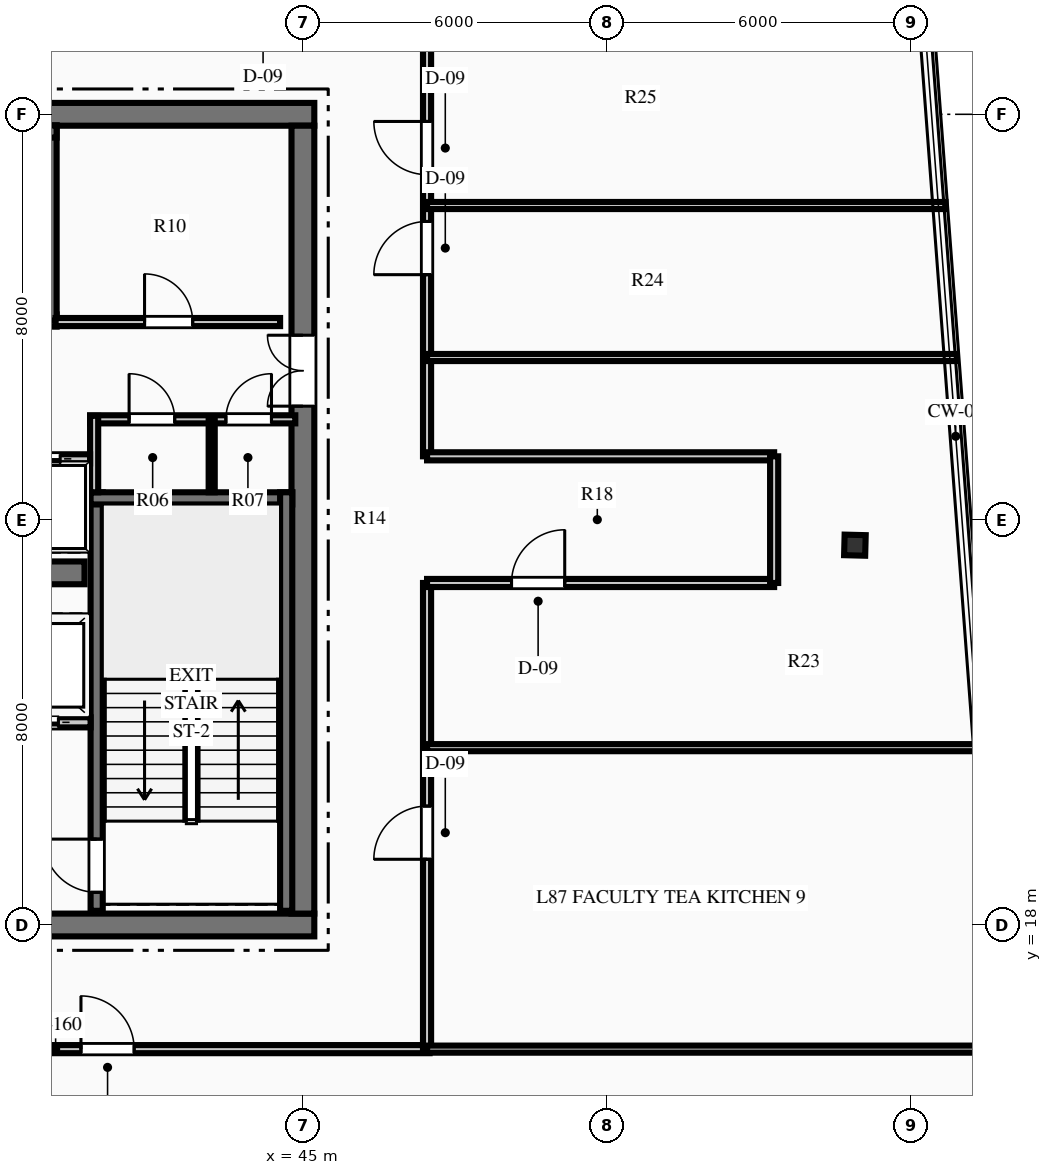
"""IFC4 building model, lengths in metres.
Left out: names, types, materials, properties, quantities, classifications, styles, units other than length and angle.
Written with IfcOpenShell. Run it as: python <this file> out.ifc"""

import sys

from ifc_helpers import new_model, si_unit, direction, frame, frame_2d, origin, origin_2d, place, context, subcontext, project, spatial, rectangle, i_section, extrude, element, fill, save


model = new_model("IFC4")
c1 = context("Model", 3, precision=1e-05, world=origin(), true_north=direction((0.0, 1.0)))
c2 = subcontext(c1, "Body", "Model", "MODEL_VIEW")
j1 = project(units=[si_unit("LENGTHUNIT", "METRE"), si_unit("PLANEANGLEUNIT", "RADIAN")], contexts=[c1])
p1 = place(None, origin())
s1 = spatial("IfcSite", under=j1, at=p1, CompositionType="ELEMENT")
p2 = place(p1, origin())
s2 = spatial("IfcBuilding", under=s1, at=p2, CompositionType="ELEMENT")
p3 = place(p2, frame((0.0, 0.0, 343.95)))
s3 = spatial("IfcBuildingStorey", under=s2, at=p3, CompositionType="ELEMENT", Elevation=343.95)
p4 = place(p3, frame((26.775, 18.0, 0.0), z_axis=(0.0, 0.0, 1.0), x_axis=(1.0, 0.0, 0.0)))
e1 = element("IfcWall", 1, at=p4, inside=s3, PredefinedType="SHEAR", context=c2, shape_type="SweptSolid", body=[
    extrude(rectangle(XDim=18.45, YDim=0.45, at=frame_2d((9.225, 0.0))), origin(), (0.0, 0.0, 1.0), 3.75),
])
p5 = place(p4, frame((7.325, 0.0, 0.0)))
e2 = element("IfcOpeningElement", 2, at=p5, cuts=e1, PredefinedType="OPENING", context=c2, shape_type="SweptSolid", body=[
    extrude(rectangle(XDim=1.1, YDim=2.15, at=frame_2d((0.55, 1.075))), frame((0.0, 0.235, 0.0), z_axis=(0.0, -1.0, 0.0), x_axis=(1.0, 0.0, 0.0)), (0.0, 0.0, 1.0), 0.47),
])
p6 = place(p4, frame((10.025, 0.0, 0.0)))
e3 = element("IfcOpeningElement", 3, at=p6, cuts=e1, PredefinedType="OPENING", context=c2, shape_type="SweptSolid", body=[
    extrude(rectangle(XDim=1.1, YDim=2.15, at=frame_2d((0.55, 1.075))), frame((0.0, 0.235, 0.0), z_axis=(0.0, -1.0, 0.0), x_axis=(1.0, 0.0, 0.0)), (0.0, 0.0, 1.0), 0.47),
])
p7 = place(p3, frame((26.775, 34.0, 0.0), z_axis=(0.0, 0.0, 1.0), x_axis=(1.0, 0.0, 0.0)))
e4 = element("IfcWall", 4, at=p7, inside=s3, PredefinedType="SHEAR", context=c2, shape_type="SweptSolid", body=[
    extrude(rectangle(XDim=18.45, YDim=0.45, at=frame_2d((9.225, 0.0))), origin(), (0.0, 0.0, 1.0), 3.75),
])
p8 = place(p3, frame((45.0, 18.225, 0.0), z_axis=(0.0, 0.0, 1.0), x_axis=(0.0, 1.0, 0.0)))
e5 = element("IfcWall", 5, at=p8, inside=s3, PredefinedType="SHEAR", context=c2, shape_type="SweptSolid", body=[
    extrude(rectangle(XDim=15.55, YDim=0.45, at=frame_2d((7.775, 0.0))), origin(), (0.0, 0.0, 1.0), 3.75),
])
p9 = place(p8, frame((10.015, 0.0, 0.0)))
e6 = element("IfcOpeningElement", 6, at=p9, cuts=e5, PredefinedType="OPENING", context=c2, shape_type="SweptSolid", body=[
    extrude(rectangle(XDim=1.4, YDim=2.2, at=frame_2d((0.7, 1.1))), frame((0.0, 0.235, 0.0), z_axis=(0.0, -1.0, 0.0), x_axis=(1.0, 0.0, 0.0)), (0.0, 0.0, 1.0), 0.47),
])
p10 = place(p3, frame((31.31, 24.95, 0.0), z_axis=(0.0, 0.0, 1.0), x_axis=(1.0, 0.0, 0.0)))
e7 = element("IfcWall", 7, at=p10, inside=s3, PredefinedType="SHEAR", context=c2, shape_type="SweptSolid", body=[
    extrude(rectangle(XDim=9.38, YDim=0.45, at=frame_2d((4.69, 0.0))), origin(), (0.0, 0.0, 1.0), 3.75),
])
p11 = place(p3, frame((40.93, 18.28, 0.0), z_axis=(0.0, 0.0, 1.0), x_axis=(0.0, 1.0, 0.0)))
e8 = element("IfcWall", 8, at=p11, inside=s3, PredefinedType="SHEAR", context=c2, shape_type="SweptSolid", body=[
    extrude(rectangle(XDim=8.26, YDim=0.24, at=frame_2d((4.13, 0.0))), origin(), (0.0, 0.0, 1.0), 3.75),
])
p12 = place(p11, frame((0.365, 0.0, 0.0)))
e9 = element("IfcOpeningElement", 9, at=p12, cuts=e8, PredefinedType="OPENING", context=c2, shape_type="SweptSolid", body=[
    extrude(rectangle(XDim=1.05, YDim=2.15, at=frame_2d((0.525, 1.075))), frame((0.0, 0.13, 0.0), z_axis=(0.0, -1.0, 0.0), x_axis=(1.0, 0.0, 0.0)), (0.0, 0.0, 1.0), 0.26),
])
p13 = place(p3, frame((40.81, 26.42, 0.0), z_axis=(0.0, 0.0, 1.0), x_axis=(1.0, 0.0, 0.0)))
e10 = element("IfcWall", 10, at=p13, inside=s3, PredefinedType="SHEAR", context=c2, shape_type="SweptSolid", body=[
    extrude(rectangle(XDim=3.98, YDim=0.24, at=frame_2d((1.99, 0.0))), origin(), (0.0, 0.0, 1.0), 3.75),
])
p14 = place(p3, frame((44.67, 18.28, 0.0), z_axis=(0.0, 0.0, 1.0), x_axis=(0.0, 1.0, 0.0)))
e11 = element("IfcWall", 11, at=p14, inside=s3, PredefinedType="SHEAR", context=c2, shape_type="SweptSolid", body=[
    extrude(rectangle(XDim=8.26, YDim=0.24, at=frame_2d((4.13, 0.0))), origin(), (0.0, 0.0, 1.0), 3.75),
])
p15 = place(p3, frame((31.76, 29.93, 0.0), z_axis=(0.0, 0.0, 1.0), x_axis=(1.0, 0.0, 0.0)))
e12 = element("IfcWall", 12, at=p15, inside=s3, PredefinedType="SHEAR", context=c2, shape_type="SweptSolid", body=[
    extrude(rectangle(XDim=8.38, YDim=0.24, at=frame_2d((4.19, 0.0))), origin(), (0.0, 0.0, 1.0), 3.75),
])
p16 = place(p15, frame((0.565, 0.0, 0.0)))
e13 = element("IfcOpeningElement", 13, at=p16, cuts=e12, PredefinedType="OPENING", context=c2, shape_type="SweptSolid", body=[
    extrude(rectangle(XDim=1.05, YDim=2.15, at=frame_2d((0.525, 1.075))), frame((0.0, 0.13, 0.0), z_axis=(0.0, -1.0, 0.0), x_axis=(1.0, 0.0, 0.0)), (0.0, 0.0, 1.0), 0.26),
])
p17 = place(p3, frame((40.02, 29.93, 0.0), z_axis=(0.0, 0.0, 1.0), x_axis=(0.0, 1.0, 0.0)))
e14 = element("IfcWall", 14, at=p17, inside=s3, PredefinedType="SHEAR", context=c2, shape_type="SweptSolid", body=[
    extrude(rectangle(XDim=3.85, YDim=0.24, at=frame_2d((1.925, 0.0))), origin(), (0.0, 0.0, 1.0), 3.75),
])
p18 = place(p3, frame((37.85, 33.66, 0.0), z_axis=(0.0, 0.0, 1.0), x_axis=(1.0, 0.0, 0.0)))
e15 = element("IfcWall", 15, at=p18, inside=s3, PredefinedType="SHEAR", context=c2, shape_type="SweptSolid", body=[
    extrude(rectangle(XDim=2.29, YDim=0.24, at=frame_2d((1.145, 0.0))), origin(), (0.0, 0.0, 1.0), 3.75),
])
p19 = place(p3, frame((55.894, 25.496, 0.0), z_axis=(0.0, 0.0, 1.0), x_axis=(0.025304572866, 0.999679788028, 0.0)))
e16 = element("IfcColumn", 16, at=p19, inside=s3, PredefinedType="COLUMN", context=c2, shape_type="SweptSolid", body=[
    extrude(i_section(OverallWidth=0.406, OverallDepth=0.416, WebThickness=0.03, FlangeThickness=0.048, at=origin_2d()), origin(), (0.0, 0.0, 1.0), 3.75),
])
p20 = place(p3, frame((36.12, 22.0, 0.0), z_axis=(0.0, 0.0, 1.0), x_axis=(1.0, 0.0, 0.0)))
e17 = element("IfcWall", 17, at=p20, inside=s3, PredefinedType="PARTITIONING", context=c2, shape_type="SweptSolid", body=[
    extrude(rectangle(XDim=4.69, YDim=0.2, at=frame_2d((2.345, 0.0))), origin(), (0.0, 0.0, 1.0), 3.43),
])
p21 = place(p20, frame((2.955, 0.0, 0.0)))
e18 = element("IfcOpeningElement", 18, at=p21, cuts=e17, PredefinedType="OPENING", context=c2, shape_type="SweptSolid", body=[
    extrude(rectangle(XDim=1.1, YDim=2.15, at=frame_2d((0.55, 1.075))), frame((0.0, 0.11, 0.0), z_axis=(0.0, -1.0, 0.0), x_axis=(1.0, 0.0, 0.0)), (0.0, 0.0, 1.0), 0.22),
])
p22 = place(p20, frame((0.08, 0.0, 0.0)))
e19 = element("IfcOpeningElement", 19, at=p22, cuts=e17, PredefinedType="OPENING", context=c2, shape_type="SweptSolid", body=[
    extrude(rectangle(XDim=1.4, YDim=2.2, at=frame_2d((0.7, 1.1))), frame((0.0, 0.11, 0.0), z_axis=(0.0, -1.0, 0.0), x_axis=(1.0, 0.0, 0.0)), (0.0, 0.0, 1.0), 0.22),
])
p23 = place(p3, frame((40.8, 27.98, 0.0), z_axis=(0.0, 0.0, 1.0), x_axis=(1.0, 0.0, 0.0)))
e20 = element("IfcWall", 20, at=p23, inside=s3, PredefinedType="PARTITIONING", context=c2, shape_type="SweptSolid", body=[
    extrude(rectangle(XDim=4.05, YDim=0.16, at=frame_2d((2.025, 0.0))), origin(), (0.0, 0.0, 1.0), 3.43),
])
p24 = place(p23, frame((0.77, 0.0, 0.0)))
e21 = element("IfcOpeningElement", 21, at=p24, cuts=e20, PredefinedType="OPENING", context=c2, shape_type="SweptSolid", body=[
    extrude(rectangle(XDim=0.9, YDim=2.15, at=frame_2d((0.45, 1.075))), frame((0.0, 0.09, 0.0), z_axis=(0.0, -1.0, 0.0), x_axis=(1.0, 0.0, 0.0)), (0.0, 0.0, 1.0), 0.18),
])
p25 = place(p23, frame((2.68, 0.0, 0.0)))
e22 = element("IfcOpeningElement", 22, at=p25, cuts=e20, PredefinedType="OPENING", context=c2, shape_type="SweptSolid", body=[
    extrude(rectangle(XDim=0.9, YDim=2.15, at=frame_2d((0.45, 1.075))), frame((0.0, 0.09, 0.0), z_axis=(0.0, -1.0, 0.0), x_axis=(1.0, 0.0, 0.0)), (0.0, 0.0, 1.0), 0.18),
])
p26 = place(p3, frame((40.88, 26.54, 0.0), z_axis=(0.0, 0.0, 1.0), x_axis=(0.0, 1.0, 0.0)))
e23 = element("IfcWall", 23, at=p26, inside=s3, PredefinedType="PARTITIONING", context=c2, shape_type="SweptSolid", body=[
    extrude(rectangle(XDim=1.51, YDim=0.16, at=frame_2d((0.755, 0.0))), origin(), (0.0, 0.0, 1.0), 3.43),
])
p27 = place(p3, frame((43.2, 26.54, 0.0), z_axis=(0.0, 0.0, 1.0), x_axis=(0.0, 1.0, 0.0)))
e24 = element("IfcWall", 24, at=p27, inside=s3, PredefinedType="PARTITIONING", context=c2, shape_type="SweptSolid", body=[
    extrude(rectangle(XDim=1.44, YDim=0.12, at=frame_2d((0.72, 0.0))), origin(), (0.0, 0.0, 1.0), 3.43),
])
p28 = place(p3, frame((40.12, 29.9, 0.0), z_axis=(0.0, 0.0, 1.0), x_axis=(1.0, 0.0, 0.0)))
e25 = element("IfcWall", 25, at=p28, inside=s3, PredefinedType="PARTITIONING", context=c2, shape_type="SweptSolid", body=[
    extrude(rectangle(XDim=4.43, YDim=0.16, at=frame_2d((2.215, 0.0))), origin(), (0.0, 0.0, 1.0), 3.43),
])
p29 = place(p28, frame((1.755, 0.0, 0.0)))
e26 = element("IfcOpeningElement", 26, at=p29, cuts=e25, PredefinedType="OPENING", context=c2, shape_type="SweptSolid", body=[
    extrude(rectangle(XDim=0.95, YDim=2.15, at=frame_2d((0.475, 1.075))), frame((0.0, 0.09, 0.0), z_axis=(0.0, -1.0, 0.0), x_axis=(1.0, 0.0, 0.0)), (0.0, 0.0, 1.0), 0.18),
])
p30 = place(p3, frame((31.2, 27.2, 0.0), z_axis=(0.0, 0.0, 1.0), x_axis=(1.0, 0.0, 0.0)))
e27 = element("IfcWall", 27, at=p30, inside=s3, PredefinedType="PARTITIONING", context=c2, shape_type="SweptSolid", body=[
    extrude(rectangle(XDim=9.6, YDim=0.18, at=frame_2d((4.8, 0.0))), origin(), (0.0, 0.0, 1.0), 3.43),
])
p31 = place(p30, frame((0.59, 0.0, 0.0)))
e28 = element("IfcOpeningElement", 28, at=p31, cuts=e27, PredefinedType="OPENING", context=c2, shape_type="SweptSolid", body=[
    extrude(rectangle(XDim=1.1, YDim=2.15, at=frame_2d((0.55, 1.075))), frame((0.0, 0.1, 0.0), z_axis=(0.0, -1.0, 0.0), x_axis=(1.0, 0.0, 0.0)), (0.0, 0.0, 1.0), 0.2),
])
p32 = place(p30, frame((2.99, 0.0, 0.0)))
e29 = element("IfcOpeningElement", 29, at=p32, cuts=e27, PredefinedType="OPENING", context=c2, shape_type="SweptSolid", body=[
    extrude(rectangle(XDim=1.1, YDim=2.15, at=frame_2d((0.55, 1.075))), frame((0.0, 0.1, 0.0), z_axis=(0.0, -1.0, 0.0), x_axis=(1.0, 0.0, 0.0)), (0.0, 0.0, 1.0), 0.2),
])
p33 = place(p30, frame((5.51, 0.0, 0.0)))
e30 = element("IfcOpeningElement", 30, at=p33, cuts=e27, PredefinedType="OPENING", context=c2, shape_type="SweptSolid", body=[
    extrude(rectangle(XDim=1.1, YDim=2.15, at=frame_2d((0.55, 1.075))), frame((0.0, 0.1, 0.0), z_axis=(0.0, -1.0, 0.0), x_axis=(1.0, 0.0, 0.0)), (0.0, 0.0, 1.0), 0.2),
])
p34 = place(p30, frame((7.91, 0.0, 0.0)))
e31 = element("IfcOpeningElement", 31, at=p34, cuts=e27, PredefinedType="OPENING", context=c2, shape_type="SweptSolid", body=[
    extrude(rectangle(XDim=1.1, YDim=2.15, at=frame_2d((0.55, 1.075))), frame((0.0, 0.1, 0.0), z_axis=(0.0, -1.0, 0.0), x_axis=(1.0, 0.0, 0.0)), (0.0, 0.0, 1.0), 0.2),
])
p35 = place(p3, frame((37.25, 15.55, 0.0), z_axis=(0.0, 0.0, 1.0), x_axis=(1.0, 0.0, 0.0)))
e32 = element("IfcWall", 32, at=p35, inside=s3, PredefinedType="PARTITIONING", context=c2, shape_type="SweptSolid", body=[
    extrude(rectangle(XDim=10.25, YDim=0.16, at=frame_2d((5.125, 0.0))), origin(), (0.0, 0.0, 1.0), 3.43),
])
p36 = place(p35, frame((3.37, 0.0, 0.0)))
e33 = element("IfcOpeningElement", 33, at=p36, cuts=e32, PredefinedType="OPENING", context=c2, shape_type="SweptSolid", body=[
    extrude(rectangle(XDim=1.05, YDim=2.15, at=frame_2d((0.525, 1.075))), frame((0.0, 0.09, 0.0), z_axis=(0.0, -1.0, 0.0), x_axis=(1.0, 0.0, 0.0)), (0.0, 0.0, 1.0), 0.18),
])
p37 = place(p3, frame((47.45, 15.55, 0.0), z_axis=(0.0, 0.0, 1.0), x_axis=(0.0, 1.0, 0.0)))
e34 = element("IfcWall", 34, at=p37, inside=s3, PredefinedType="PARTITIONING", context=c2, shape_type="SweptSolid", body=[
    extrude(rectangle(XDim=9.2, YDim=0.16, at=frame_2d((4.6, 0.0))), origin(), (0.0, 0.0, 1.0), 3.43),
])
p38 = place(p37, frame((3.747, 0.0, 0.0)))
e35 = element("IfcOpeningElement", 35, at=p38, cuts=e34, PredefinedType="OPENING", context=c2, shape_type="SweptSolid", body=[
    extrude(rectangle(XDim=1.05, YDim=2.15, at=frame_2d((0.525, 1.075))), frame((0.0, 0.09, 0.0), z_axis=(0.0, -1.0, 0.0), x_axis=(1.0, 0.0, 0.0)), (0.0, 0.0, 1.0), 0.18),
])
p39 = place(p3, frame((47.45, 27.25, 0.0), z_axis=(0.0, 0.0, 1.0), x_axis=(0.0, 1.0, 0.0)))
e36 = element("IfcWall", 36, at=p39, inside=s3, PredefinedType="PARTITIONING", context=c2, shape_type="SweptSolid", body=[
    extrude(rectangle(XDim=9.2, YDim=0.16, at=frame_2d((4.6, 0.0))), origin(), (0.0, 0.0, 1.0), 3.43),
])
p40 = place(p39, frame((3.585, 0.0, 0.0)))
e37 = element("IfcOpeningElement", 37, at=p40, cuts=e36, PredefinedType="OPENING", context=c2, shape_type="SweptSolid", body=[
    extrude(rectangle(XDim=1.05, YDim=2.15, at=frame_2d((0.525, 1.075))), frame((0.0, 0.09, 0.0), z_axis=(0.0, -1.0, 0.0), x_axis=(1.0, 0.0, 0.0)), (0.0, 0.0, 1.0), 0.18),
])
p41 = place(p39, frame((5.559, 0.0, 0.0)))
e38 = element("IfcOpeningElement", 38, at=p41, cuts=e36, PredefinedType="OPENING", context=c2, shape_type="SweptSolid", body=[
    extrude(rectangle(XDim=1.05, YDim=2.15, at=frame_2d((0.525, 1.075))), frame((0.0, 0.09, 0.0), z_axis=(0.0, -1.0, 0.0), x_axis=(1.0, 0.0, 0.0)), (0.0, 0.0, 1.0), 0.18),
])
p42 = place(p3, frame((47.45, 24.75, 0.0), z_axis=(0.0, 0.0, 1.0), x_axis=(1.0, 0.0, 0.0)))
e39 = element("IfcWall", 39, at=p42, inside=s3, PredefinedType="PARTITIONING", context=c2, shape_type="SweptSolid", body=[
    extrude(rectangle(XDim=6.85, YDim=0.16, at=frame_2d((3.425, 0.0))), origin(), (0.0, 0.0, 1.0), 3.43),
])
p43 = place(p42, frame((1.667, 0.0, 0.0)))
e40 = element("IfcOpeningElement", 40, at=p43, cuts=e39, PredefinedType="OPENING", context=c2, shape_type="SweptSolid", body=[
    extrude(rectangle(XDim=1.05, YDim=2.15, at=frame_2d((0.525, 1.075))), frame((0.0, 0.09, 0.0), z_axis=(0.0, -1.0, 0.0), x_axis=(1.0, 0.0, 0.0)), (0.0, 0.0, 1.0), 0.18),
])
p44 = place(p3, frame((47.45, 27.25, 0.0), z_axis=(0.0, 0.0, 1.0), x_axis=(1.0, 0.0, 0.0)))
e41 = element("IfcWall", 41, at=p44, inside=s3, PredefinedType="PARTITIONING", context=c2, shape_type="SweptSolid", body=[
    extrude(rectangle(XDim=6.85, YDim=0.16, at=frame_2d((3.425, 0.0))), origin(), (0.0, 0.0, 1.0), 3.43),
])
p45 = place(p3, frame((54.3, 24.75, 0.0), z_axis=(0.0, 0.0, 1.0), x_axis=(0.0, 1.0, 0.0)))
e42 = element("IfcWall", 42, at=p45, inside=s3, PredefinedType="PARTITIONING", context=c2, shape_type="SweptSolid", body=[
    extrude(rectangle(XDim=2.5, YDim=0.16, at=frame_2d((1.25, 0.0))), origin(), (0.0, 0.0, 1.0), 3.43),
])
p46 = place(p3, frame((47.45, 15.55, 0.0), z_axis=(0.0, 0.0, 1.0), x_axis=(1.0, 0.0, 0.0)))
e43 = element("IfcWall", 43, at=p46, inside=s3, PredefinedType="PARTITIONING", context=c2, shape_type="SweptSolid", body=[
    extrude(rectangle(XDim=11.483, YDim=0.14, at=frame_2d((5.742, 0.0))), origin(), (0.0, 0.0, 1.0), 3.019),
])
p47 = place(p3, frame((47.45, 21.5, 0.0), z_axis=(0.0, 0.0, 1.0), x_axis=(1.0, 0.0, 0.0)))
e44 = element("IfcWall", 44, at=p47, inside=s3, PredefinedType="PARTITIONING", context=c2, shape_type="SweptSolid", body=[
    extrude(rectangle(XDim=11.036, YDim=0.14, at=frame_2d((5.518, 0.0))), origin(), (0.0, 0.0, 1.0), 3.43),
])
p48 = place(p3, frame((47.45, 29.2, 0.0), z_axis=(0.0, 0.0, 1.0), x_axis=(1.0, 0.0, 0.0)))
e45 = element("IfcWall", 45, at=p48, inside=s3, PredefinedType="PARTITIONING", context=c2, shape_type="SweptSolid", body=[
    extrude(rectangle(XDim=10.457, YDim=0.14, at=frame_2d((5.229, 0.0))), origin(), (0.0, 0.0, 1.0), 3.43),
])
p49 = place(p3, frame((47.45, 32.2, 0.0), z_axis=(0.0, 0.0, 1.0), x_axis=(1.0, 0.0, 0.0)))
e46 = element("IfcWall", 46, at=p49, inside=s3, PredefinedType="PARTITIONING", context=c2, shape_type="SweptSolid", body=[
    extrude(rectangle(XDim=10.231, YDim=0.14, at=frame_2d((5.116, 0.0))), origin(), (0.0, 0.0, 1.0), 3.43),
])
p50 = place(p24, origin())
e47 = element("IfcDoor", 47, at=p50, inside=s3, OperationType="SINGLE_SWING_LEFT", PredefinedType="DOOR", context=c2, shape_type="SweptSolid", body=[
    extrude(rectangle(XDim=0.9, YDim=2.15, at=frame_2d((0.45, 1.075))), frame((0.0, 0.025, 0.0), z_axis=(0.0, -1.0, 0.0), x_axis=(1.0, 0.0, 0.0)), (0.0, 0.0, 1.0), 0.05),
])
fill(e21, e47)
p51 = place(p25, origin())
e48 = element("IfcDoor", 48, at=p51, inside=s3, OperationType="SINGLE_SWING_RIGHT", PredefinedType="DOOR", context=c2, shape_type="SweptSolid", body=[
    extrude(rectangle(XDim=0.9, YDim=2.15, at=frame_2d((0.45, 1.075))), frame((0.0, 0.025, 0.0), z_axis=(0.0, -1.0, 0.0), x_axis=(1.0, 0.0, 0.0)), (0.0, 0.0, 1.0), 0.05),
])
fill(e22, e48)
p52 = place(p29, origin())
e49 = element("IfcDoor", 49, at=p52, inside=s3, OperationType="SINGLE_SWING_LEFT", PredefinedType="DOOR", context=c2, shape_type="SweptSolid", body=[
    extrude(rectangle(XDim=0.95, YDim=2.15, at=frame_2d((0.475, 1.075))), frame((0.0, 0.025, 0.0), z_axis=(0.0, -1.0, 0.0), x_axis=(1.0, 0.0, 0.0)), (0.0, 0.0, 1.0), 0.05),
])
fill(e26, e49)
p53 = place(p12, origin())
e50 = element("IfcDoor", 50, at=p53, inside=s3, OperationType="SINGLE_SWING_RIGHT", PredefinedType="DOOR", context=c2, shape_type="SweptSolid", body=[
    extrude(rectangle(XDim=1.05, YDim=2.15, at=frame_2d((0.525, 1.075))), frame((0.0, 0.025, 0.0), z_axis=(0.0, -1.0, 0.0), x_axis=(1.0, 0.0, 0.0)), (0.0, 0.0, 1.0), 0.05),
])
fill(e9, e50)
p54 = place(p9, origin())
e51 = element("IfcDoor", 51, at=p54, inside=s3, OperationType="DOUBLE_DOOR_SINGLE_SWING", PredefinedType="DOOR", context=c2, shape_type="SweptSolid", body=[
    extrude(rectangle(XDim=1.4, YDim=2.2, at=frame_2d((0.7, 1.1))), frame((0.0, 0.025, 0.0), z_axis=(0.0, -1.0, 0.0), x_axis=(1.0, 0.0, 0.0)), (0.0, 0.0, 1.0), 0.05),
])
fill(e6, e51)
p55 = place(p36, origin())
e52 = element("IfcDoor", 52, at=p55, inside=s3, OperationType="SINGLE_SWING_LEFT", PredefinedType="DOOR", context=c2, shape_type="SweptSolid", body=[
    extrude(rectangle(XDim=1.05, YDim=2.15, at=frame_2d((0.525, 1.075))), frame((0.0, 0.025, 0.0), z_axis=(0.0, -1.0, 0.0), x_axis=(1.0, 0.0, 0.0)), (0.0, 0.0, 1.0), 0.05),
])
fill(e33, e52)
p56 = place(p38, origin())
e53 = element("IfcDoor", 53, at=p56, inside=s3, OperationType="SINGLE_SWING_LEFT", PredefinedType="DOOR", context=c2, shape_type="SweptSolid", body=[
    extrude(rectangle(XDim=1.05, YDim=2.15, at=frame_2d((0.525, 1.075))), frame((0.0, 0.025, 0.0), z_axis=(0.0, -1.0, 0.0), x_axis=(1.0, 0.0, 0.0)), (0.0, 0.0, 1.0), 0.05),
])
fill(e35, e53)
p57 = place(p43, origin())
e54 = element("IfcDoor", 54, at=p57, inside=s3, OperationType="SINGLE_SWING_RIGHT", PredefinedType="DOOR", context=c2, shape_type="SweptSolid", body=[
    extrude(rectangle(XDim=1.05, YDim=2.15, at=frame_2d((0.525, 1.075))), frame((0.0, 0.025, 0.0), z_axis=(0.0, -1.0, 0.0), x_axis=(1.0, 0.0, 0.0)), (0.0, 0.0, 1.0), 0.05),
])
fill(e40, e54)
p58 = place(p40, origin())
e55 = element("IfcDoor", 55, at=p58, inside=s3, OperationType="SINGLE_SWING_LEFT", PredefinedType="DOOR", context=c2, shape_type="SweptSolid", body=[
    extrude(rectangle(XDim=1.05, YDim=2.15, at=frame_2d((0.525, 1.075))), frame((0.0, 0.025, 0.0), z_axis=(0.0, -1.0, 0.0), x_axis=(1.0, 0.0, 0.0)), (0.0, 0.0, 1.0), 0.05),
])
fill(e37, e55)
p59 = place(p41, origin())
e56 = element("IfcDoor", 56, at=p59, inside=s3, OperationType="SINGLE_SWING_RIGHT", PredefinedType="DOOR", context=c2, shape_type="SweptSolid", body=[
    extrude(rectangle(XDim=1.05, YDim=2.15, at=frame_2d((0.525, 1.075))), frame((0.0, 0.025, 0.0), z_axis=(0.0, -1.0, 0.0), x_axis=(1.0, 0.0, 0.0)), (0.0, 0.0, 1.0), 0.05),
])
fill(e38, e56)
p60 = place(p34, origin())
e57 = element("IfcDoor", 57, at=p60, inside=s3, OperationType="SLIDING_TO_LEFT", PredefinedType="DOOR", context=c2, shape_type="SweptSolid", body=[
    extrude(rectangle(XDim=1.1, YDim=2.15, at=frame_2d((0.55, 1.075))), frame((0.0, 0.025, 0.0), z_axis=(0.0, -1.0, 0.0), x_axis=(1.0, 0.0, 0.0)), (0.0, 0.0, 1.0), 0.05),
])
fill(e31, e57)
p61 = place(p21, origin())
e58 = element("IfcDoor", 58, at=p61, inside=s3, OperationType="SLIDING_TO_LEFT", PredefinedType="DOOR", context=c2, shape_type="SweptSolid", body=[
    extrude(rectangle(XDim=1.1, YDim=2.15, at=frame_2d((0.55, 1.075))), frame((0.0, 0.025, 0.0), z_axis=(0.0, -1.0, 0.0), x_axis=(1.0, 0.0, 0.0)), (0.0, 0.0, 1.0), 0.05),
])
fill(e18, e58)
save(model, sys.argv[1])
